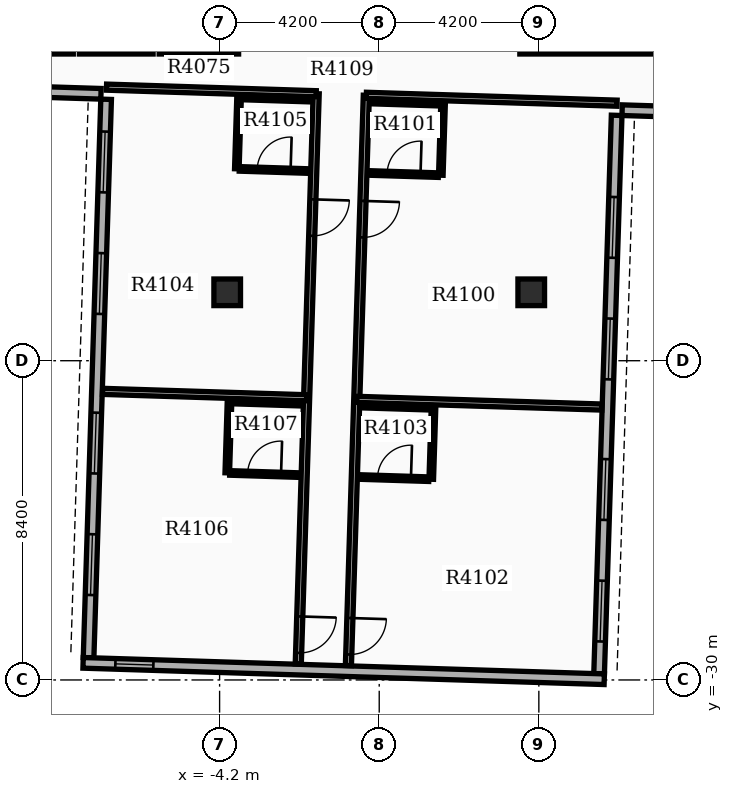
"""IFC4 building model, lengths in metres.
Left out: names, types, materials, properties, quantities, classifications, styles, units other than length and angle.
Written with IfcOpenShell. Run it as: python <this file> out.ifc"""

import sys

from ifc_helpers import new_model, si_unit, direction, frame, frame_2d, origin, origin_2d, place, context, subcontext, project, spatial, rectangle, extrude, element, fill, save


model = new_model("IFC4")
c1 = context("Model", 3, precision=1e-05, world=origin(), true_north=direction((0.0, 1.0)))
c2 = subcontext(c1, "Body", "Model", "MODEL_VIEW")
j1 = project(units=[si_unit("LENGTHUNIT", "METRE"), si_unit("PLANEANGLEUNIT", "RADIAN")], contexts=[c1])
p1 = place(None, origin())
s1 = spatial("IfcSite", under=j1, at=p1, CompositionType="ELEMENT")
p2 = place(p1, origin())
s2 = spatial("IfcBuilding", under=s1, at=p2, CompositionType="ELEMENT")
p3 = place(p2, frame((0.0, 0.0, 257.7)))
s3 = spatial("IfcBuildingStorey", under=s2, at=p3, CompositionType="ELEMENT", Elevation=257.7)
for number, where, z_axis, x_axis in (
    (1, (-4.0, -19.8, 0.0), (0.0, 0.0, 1.0), (1.0, 0.0, 0.0)),
    (2, (4.0, -19.8, 0.0), (0.0, 0.0, 1.0), (1.0, 0.0, 0.0)),
):
    element("IfcColumn", number, at=place(p3, frame(where, z_axis=z_axis, x_axis=x_axis)), inside=s3, PredefinedType="COLUMN", context=c2, shape_type="SweptSolid", body=[
        extrude(rectangle(XDim=0.7, YDim=0.7, at=origin_2d()), origin(), (0.0, 0.0, 1.0), 3.9),
    ])
p4 = place(p3, frame((-7.186, -14.721, 0.0), z_axis=(0.0, 0.0, 1.0), x_axis=(-0.031405855522, -0.999506714454, 0.0)))
e3 = element("IfcWall", 3, at=p4, inside=s3, PredefinedType="STANDARD", context=c2, shape_type="SweptSolid", body=[
    extrude(rectangle(XDim=14.7, YDim=0.28, at=frame_2d((7.35, 0.0))), origin(), (0.0, 0.0, 1.0), 3.18),
])
p5 = place(p4, frame((0.85, 0.0, 0.8)))
e4 = element("IfcOpeningElement", 4, at=p5, cuts=e3, PredefinedType="OPENING", context=c2, shape_type="SweptSolid", body=[
    extrude(rectangle(XDim=1.6, YDim=1.7, at=frame_2d((0.8, 0.85))), frame((0.0, 0.15, 0.0), z_axis=(0.0, -1.0, 0.0), x_axis=(1.0, 0.0, 0.0)), (0.0, 0.0, 1.0), 0.3),
])
p6 = place(p4, frame((4.05, 0.0, 0.8)))
e5 = element("IfcOpeningElement", 5, at=p6, cuts=e3, PredefinedType="OPENING", context=c2, shape_type="SweptSolid", body=[
    extrude(rectangle(XDim=1.6, YDim=1.7, at=frame_2d((0.8, 0.85))), frame((0.0, 0.15, 0.0), z_axis=(0.0, -1.0, 0.0), x_axis=(1.0, 0.0, 0.0)), (0.0, 0.0, 1.0), 0.3),
])
p7 = place(p4, frame((8.25, 0.0, 0.8)))
e6 = element("IfcOpeningElement", 6, at=p7, cuts=e3, PredefinedType="OPENING", context=c2, shape_type="SweptSolid", body=[
    extrude(rectangle(XDim=1.6, YDim=1.7, at=frame_2d((0.8, 0.85))), frame((0.0, 0.15, 0.0), z_axis=(0.0, -1.0, 0.0), x_axis=(1.0, 0.0, 0.0)), (0.0, 0.0, 1.0), 0.3),
])
p8 = place(p4, frame((11.45, 0.0, 0.8)))
e7 = element("IfcOpeningElement", 7, at=p8, cuts=e3, PredefinedType="OPENING", context=c2, shape_type="SweptSolid", body=[
    extrude(rectangle(XDim=1.6, YDim=1.7, at=frame_2d((0.8, 0.85))), frame((0.0, 0.15, 0.0), z_axis=(0.0, -1.0, 0.0), x_axis=(1.0, 0.0, 0.0)), (0.0, 0.0, 1.0), 0.3),
])
p9 = place(p3, frame((5.786, -29.836, 0.0), z_axis=(0.0, 0.0, 1.0), x_axis=(0.031406376864, 0.999506698073, 0.0)))
e8 = element("IfcWall", 8, at=p9, inside=s3, PredefinedType="STANDARD", context=c2, shape_type="SweptSolid", body=[
    extrude(rectangle(XDim=14.7, YDim=0.28, at=frame_2d((7.35, 0.0))), origin(), (0.0, 0.0, 1.0), 3.18),
])
p10 = place(p9, frame((0.85, 0.0, 0.8)))
e9 = element("IfcOpeningElement", 9, at=p10, cuts=e8, PredefinedType="OPENING", context=c2, shape_type="SweptSolid", body=[
    extrude(rectangle(XDim=1.6, YDim=1.7, at=frame_2d((0.8, 0.85))), frame((0.0, 0.15, 0.0), z_axis=(0.0, -1.0, 0.0), x_axis=(1.0, 0.0, 0.0)), (0.0, 0.0, 1.0), 0.3),
])
p11 = place(p9, frame((4.05, 0.0, 0.8)))
e10 = element("IfcOpeningElement", 10, at=p11, cuts=e8, PredefinedType="OPENING", context=c2, shape_type="SweptSolid", body=[
    extrude(rectangle(XDim=1.6, YDim=1.7, at=frame_2d((0.8, 0.85))), frame((0.0, 0.15, 0.0), z_axis=(0.0, -1.0, 0.0), x_axis=(1.0, 0.0, 0.0)), (0.0, 0.0, 1.0), 0.3),
])
p12 = place(p9, frame((7.75, 0.0, 0.8)))
e11 = element("IfcOpeningElement", 11, at=p12, cuts=e8, PredefinedType="OPENING", context=c2, shape_type="SweptSolid", body=[
    extrude(rectangle(XDim=1.6, YDim=1.7, at=frame_2d((0.8, 0.85))), frame((0.0, 0.15, 0.0), z_axis=(0.0, -1.0, 0.0), x_axis=(1.0, 0.0, 0.0)), (0.0, 0.0, 1.0), 0.3),
])
p13 = place(p9, frame((10.95, 0.0, 0.8)))
e12 = element("IfcOpeningElement", 12, at=p13, cuts=e8, PredefinedType="OPENING", context=c2, shape_type="SweptSolid", body=[
    extrude(rectangle(XDim=1.6, YDim=1.7, at=frame_2d((0.8, 0.85))), frame((0.0, 0.15, 0.0), z_axis=(0.0, -1.0, 0.0), x_axis=(1.0, 0.0, 0.0)), (0.0, 0.0, 1.0), 0.3),
])
p14 = place(p3, frame((-7.792, -29.55, 0.0), z_axis=(0.0, 0.0, 1.0), x_axis=(0.999506662003, -0.031407524763, 0.0)))
e13 = element("IfcWall", 13, at=p14, inside=s3, PredefinedType="STANDARD", context=c2, shape_type="SweptSolid", body=[
    extrude(rectangle(XDim=13.72, YDim=0.28, at=frame_2d((6.86, 0.0))), origin(), (0.0, 0.0, 1.0), 3.18),
])
p15 = place(p14, frame((0.85, 0.0, 0.85)))
e14 = element("IfcOpeningElement", 14, at=p15, cuts=e13, PredefinedType="OPENING", context=c2, shape_type="SweptSolid", body=[
    extrude(rectangle(XDim=1.0, YDim=1.5, at=frame_2d((0.5, 0.75))), frame((0.0, 0.15, 0.0), z_axis=(0.0, -1.0, 0.0), x_axis=(1.0, 0.0, 0.0)), (0.0, 0.0, 1.0), 0.3),
])
p16 = place(p3, frame((-13.618, -14.379, 0.0), z_axis=(0.0, 0.0, 1.0), x_axis=(0.999507224741, -0.031389611199, 0.0)))
e15 = element("IfcWall", 15, at=p16, inside=s3, PredefinedType="STANDARD", context=c2, shape_type="SweptSolid", body=[
    extrude(rectangle(XDim=6.3, YDim=0.28, at=frame_2d((3.15, 0.0))), origin(), (0.0, 0.0, 1.0), 3.18),
])
p17 = place(p3, frame((12.689, -15.206, 0.0), z_axis=(0.0, 0.0, 1.0), x_axis=(-0.999507262922, 0.031388395416, 0.0)))
e16 = element("IfcWall", 16, at=p17, inside=s3, PredefinedType="STANDARD", context=c2, shape_type="SweptSolid", body=[
    extrude(rectangle(XDim=6.3, YDim=0.28, at=frame_2d((3.15, 0.0))), origin(), (0.0, 0.0, 1.0), 3.18),
])
p18 = place(p3, frame((3.7, -13.45, 0.0), z_axis=(0.0, 0.0, 1.0), x_axis=(1.0, 0.0, 0.0)))
e17 = element("IfcWall", 17, at=p18, inside=s3, PredefinedType="PARTITIONING", context=c2, shape_type="SweptSolid", body=[
    extrude(rectangle(XDim=3.85, YDim=0.16, at=frame_2d((1.925, 0.0))), origin(), (0.0, 0.0, 1.0), 3.17),
])
p19 = place(p3, frame((-11.0, -13.45, 0.0), z_axis=(0.0, 0.0, 1.0), x_axis=(1.0, 0.0, 0.0)))
e18 = element("IfcWall", 18, at=p19, inside=s3, PredefinedType="PARTITIONING", context=c2, shape_type="SweptSolid", body=[
    extrude(rectangle(XDim=2.95, YDim=0.16, at=frame_2d((1.475, 0.0))), origin(), (0.0, 0.0, 1.0), 3.17),
])
p20 = place(p3, frame((-7.89, -13.45, 0.0), z_axis=(0.0, 0.0, 1.0), x_axis=(1.0, 0.0, 0.0)))
e19 = element("IfcWall", 19, at=p20, inside=s3, PredefinedType="PARTITIONING", context=c2, shape_type="SweptSolid", body=[
    extrude(rectangle(XDim=1.94, YDim=0.16, at=frame_2d((0.97, 0.0))), origin(), (0.0, 0.0, 1.0), 3.17),
])
p21 = place(p3, frame((-5.79, -13.45, 0.0), z_axis=(0.0, 0.0, 1.0), x_axis=(1.0, 0.0, 0.0)))
e20 = element("IfcWall", 20, at=p21, inside=s3, PredefinedType="PARTITIONING", context=c2, shape_type="SweptSolid", body=[
    extrude(rectangle(XDim=2.09, YDim=0.16, at=frame_2d((1.045, 0.0))), origin(), (0.0, 0.0, 1.0), 3.17),
])
p22 = place(p3, frame((-0.339, -14.617, 0.0), z_axis=(0.0, 0.0, 1.0), x_axis=(-0.031404333983, -0.999506762262, 0.0)))
e21 = element("IfcWall", 21, at=p22, inside=s3, PredefinedType="PARTITIONING", context=c2, shape_type="SweptSolid", body=[
    extrude(rectangle(XDim=15.012, YDim=0.16, at=frame_2d((7.506, 0.0))), origin(), (0.0, 0.0, 1.0), 3.17),
])
p23 = place(p22, frame((2.78, 0.0, 0.0)))
e22 = element("IfcOpeningElement", 22, at=p23, cuts=e21, PredefinedType="OPENING", context=c2, shape_type="SweptSolid", body=[
    extrude(rectangle(XDim=0.96, YDim=2.15, at=frame_2d((0.48, 1.075))), frame((0.0, 0.09, 0.0), z_axis=(0.0, -1.0, 0.0), x_axis=(1.0, 0.0, 0.0)), (0.0, 0.0, 1.0), 0.18),
])
p24 = place(p22, frame((13.76, 0.0, 0.0)))
e23 = element("IfcOpeningElement", 23, at=p24, cuts=e21, PredefinedType="OPENING", context=c2, shape_type="SweptSolid", body=[
    extrude(rectangle(XDim=0.96, YDim=2.15, at=frame_2d((0.48, 1.075))), frame((0.0, 0.09, 0.0), z_axis=(0.0, -1.0, 0.0), x_axis=(1.0, 0.0, 0.0)), (0.0, 0.0, 1.0), 0.18),
])
p25 = place(p3, frame((-0.339, -14.617, 0.0), z_axis=(0.0, 0.0, 1.0), x_axis=(0.999506756764, -0.031404508956, 0.0)))
e24 = element("IfcWall", 24, at=p25, inside=s3, PredefinedType="PARTITIONING", context=c2, shape_type="SweptSolid", body=[
    extrude(rectangle(XDim=6.6, YDim=0.16, at=frame_2d((3.3, 0.0))), origin(), (0.0, 0.0, 1.0), 3.17),
])
p26 = place(p3, frame((-0.591, -22.617, 0.0), z_axis=(0.0, 0.0, 1.0), x_axis=(0.999506708632, -0.031406040816, 0.0)))
e25 = element("IfcWall", 25, at=p26, inside=s3, PredefinedType="PARTITIONING", context=c2, shape_type="SweptSolid", body=[
    extrude(rectangle(XDim=6.452, YDim=0.16, at=frame_2d((3.226, 0.0))), origin(), (0.0, 0.0, 1.0), 3.17),
])
p27 = place(p3, frame((-0.263, -16.66, 0.0), z_axis=(0.0, 0.0, 1.0), x_axis=(0.999507221803, -0.031389704724, 0.0)))
e26 = element("IfcWall", 26, at=p27, inside=s3, PredefinedType="PARTITIONING", context=c2, shape_type="SweptSolid", body=[
    extrude(rectangle(XDim=1.82, YDim=0.12, at=frame_2d((0.91, 0.0))), origin(), (0.0, 0.0, 1.0), 3.17),
])
p28 = place(p27, frame((0.47, 0.0, 0.0)))
e27 = element("IfcOpeningElement", 27, at=p28, cuts=e26, PredefinedType="OPENING", context=c2, shape_type="SweptSolid", body=[
    extrude(rectangle(XDim=0.88, YDim=2.1, at=frame_2d((0.44, 1.05))), frame((0.0, 0.07, 0.0), z_axis=(0.0, -1.0, 0.0), x_axis=(1.0, 0.0, 0.0)), (0.0, 0.0, 1.0), 0.14),
])
p29 = place(p3, frame((-0.204, -14.781, 0.0), z_axis=(0.0, 0.0, 1.0), x_axis=(0.999511421504, -0.031255692016, 0.0)))
e28 = element("IfcWall", 28, at=p29, inside=s3, PredefinedType="PARTITIONING", context=c2, shape_type="SweptSolid", body=[
    extrude(rectangle(XDim=1.82, YDim=0.12, at=frame_2d((0.91, 0.0))), origin(), (0.0, 0.0, 1.0), 3.17),
])
p30 = place(p3, frame((1.68, -14.84, 0.0), z_axis=(0.0, 0.0, 1.0), x_axis=(-0.031425292588, -0.999506103526, 0.0)))
e29 = element("IfcWall", 29, at=p30, inside=s3, PredefinedType="PARTITIONING", context=c2, shape_type="SweptSolid", body=[
    extrude(rectangle(XDim=1.88, YDim=0.12, at=frame_2d((0.94, 0.0))), origin(), (0.0, 0.0, 1.0), 3.17),
])
p31 = place(p3, frame((-0.515, -24.66, 0.0), z_axis=(0.0, 0.0, 1.0), x_axis=(0.999503004171, -0.03152371574, 0.0)))
e30 = element("IfcWall", 30, at=p31, inside=s3, PredefinedType="PARTITIONING", context=c2, shape_type="SweptSolid", body=[
    extrude(rectangle(XDim=1.82, YDim=0.12, at=frame_2d((0.91, 0.0))), origin(), (0.0, 0.0, 1.0), 3.17),
])
p32 = place(p31, frame((0.47, 0.0, 0.0)))
e31 = element("IfcOpeningElement", 31, at=p32, cuts=e30, PredefinedType="OPENING", context=c2, shape_type="SweptSolid", body=[
    extrude(rectangle(XDim=0.88, YDim=2.1, at=frame_2d((0.44, 1.05))), frame((0.0, 0.07, 0.0), z_axis=(0.0, -1.0, 0.0), x_axis=(1.0, 0.0, 0.0)), (0.0, 0.0, 1.0), 0.14),
])
p33 = place(p3, frame((-0.456, -22.781, 0.0), z_axis=(0.0, 0.0, 1.0), x_axis=(0.999507221803, -0.031389704724, 0.0)))
e32 = element("IfcWall", 32, at=p33, inside=s3, PredefinedType="PARTITIONING", context=c2, shape_type="SweptSolid", body=[
    extrude(rectangle(XDim=1.82, YDim=0.12, at=frame_2d((0.91, 0.0))), origin(), (0.0, 0.0, 1.0), 3.17),
])
p34 = place(p3, frame((1.428, -22.84, 0.0), z_axis=(0.0, 0.0, 1.0), x_axis=(-0.031425292588, -0.999506103526, 0.0)))
e33 = element("IfcWall", 33, at=p34, inside=s3, PredefinedType="PARTITIONING", context=c2, shape_type="SweptSolid", body=[
    extrude(rectangle(XDim=1.88, YDim=0.12, at=frame_2d((0.94, 0.0))), origin(), (0.0, 0.0, 1.0), 3.17),
])
p35 = place(p3, frame((-1.659, -14.575, 0.0), z_axis=(0.0, 0.0, 1.0), x_axis=(-0.031404333983, -0.999506762262, 0.0)))
e34 = element("IfcWall", 34, at=p35, inside=s3, PredefinedType="PARTITIONING", context=c2, shape_type="SweptSolid", body=[
    extrude(rectangle(XDim=15.012, YDim=0.16, at=frame_2d((7.506, 0.0))), origin(), (0.0, 0.0, 1.0), 3.17),
])
p36 = place(p35, frame((2.78, 0.0, 0.0)))
e35 = element("IfcOpeningElement", 35, at=p36, cuts=e34, PredefinedType="OPENING", context=c2, shape_type="SweptSolid", body=[
    extrude(rectangle(XDim=0.96, YDim=2.15, at=frame_2d((0.48, 1.075))), frame((0.0, 0.09, 0.0), z_axis=(0.0, -1.0, 0.0), x_axis=(1.0, 0.0, 0.0)), (0.0, 0.0, 1.0), 0.18),
])
p37 = place(p35, frame((13.76, 0.0, 0.0)))
e36 = element("IfcOpeningElement", 36, at=p37, cuts=e34, PredefinedType="OPENING", context=c2, shape_type="SweptSolid", body=[
    extrude(rectangle(XDim=0.96, YDim=2.15, at=frame_2d((0.48, 1.075))), frame((0.0, 0.09, 0.0), z_axis=(0.0, -1.0, 0.0), x_axis=(1.0, 0.0, 0.0)), (0.0, 0.0, 1.0), 0.18),
])
p38 = place(p3, frame((-1.659, -14.575, 0.0), z_axis=(0.0, 0.0, 1.0), x_axis=(-0.999505408206, 0.031447400002, 0.0)))
e37 = element("IfcWall", 37, at=p38, inside=s3, PredefinedType="PARTITIONING", context=c2, shape_type="SweptSolid", body=[
    extrude(rectangle(XDim=5.52, YDim=0.16, at=frame_2d((2.76, 0.0))), origin(), (0.0, 0.0, 1.0), 3.17),
])
p39 = place(p3, frame((-1.91, -22.575, 0.0), z_axis=(0.0, 0.0, 1.0), x_axis=(-0.999506785589, 0.031403591545, 0.0)))
e38 = element("IfcWall", 38, at=p39, inside=s3, PredefinedType="PARTITIONING", context=c2, shape_type="SweptSolid", body=[
    extrude(rectangle(XDim=5.372, YDim=0.16, at=frame_2d((2.686, 0.0))), origin(), (0.0, 0.0, 1.0), 3.17),
])
p40 = place(p3, frame((-3.682, -16.552, 0.0), z_axis=(0.0, 0.0, 1.0), x_axis=(0.999507221803, -0.031389704724, 0.0)))
e39 = element("IfcWall", 39, at=p40, inside=s3, PredefinedType="PARTITIONING", context=c2, shape_type="SweptSolid", body=[
    extrude(rectangle(XDim=1.82, YDim=0.12, at=frame_2d((0.91, 0.0))), origin(), (0.0, 0.0, 1.0), 3.17),
])
p41 = place(p40, frame((0.47, 0.0, 0.0)))
e40 = element("IfcOpeningElement", 40, at=p41, cuts=e39, PredefinedType="OPENING", context=c2, shape_type="SweptSolid", body=[
    extrude(rectangle(XDim=0.88, YDim=2.1, at=frame_2d((0.44, 1.05))), frame((0.0, 0.07, 0.0), z_axis=(0.0, -1.0, 0.0), x_axis=(1.0, 0.0, 0.0)), (0.0, 0.0, 1.0), 0.14),
])
p42 = place(p3, frame((-3.623, -14.673, 0.0), z_axis=(0.0, 0.0, 1.0), x_axis=(0.999503004171, -0.03152371574, 0.0)))
e41 = element("IfcWall", 41, at=p42, inside=s3, PredefinedType="PARTITIONING", context=c2, shape_type="SweptSolid", body=[
    extrude(rectangle(XDim=1.82, YDim=0.12, at=frame_2d((0.91, 0.0))), origin(), (0.0, 0.0, 1.0), 3.17),
])
p43 = place(p3, frame((-3.688, -14.671, 0.0), z_axis=(0.0, 0.0, 1.0), x_axis=(-0.031295563454, -0.999510173889, 0.0)))
e42 = element("IfcWall", 42, at=p43, inside=s3, PredefinedType="PARTITIONING", context=c2, shape_type="SweptSolid", body=[
    extrude(rectangle(XDim=1.88, YDim=0.12, at=frame_2d((0.94, 0.0))), origin(), (0.0, 0.0, 1.0), 3.17),
])
p44 = place(p3, frame((-3.933, -24.552, 0.0), z_axis=(0.0, 0.0, 1.0), x_axis=(0.999507221803, -0.031389704724, 0.0)))
e43 = element("IfcWall", 43, at=p44, inside=s3, PredefinedType="PARTITIONING", context=c2, shape_type="SweptSolid", body=[
    extrude(rectangle(XDim=1.82, YDim=0.12, at=frame_2d((0.91, 0.0))), origin(), (0.0, 0.0, 1.0), 3.17),
])
p45 = place(p44, frame((0.47, 0.0, 0.0)))
e44 = element("IfcOpeningElement", 44, at=p45, cuts=e43, PredefinedType="OPENING", context=c2, shape_type="SweptSolid", body=[
    extrude(rectangle(XDim=0.88, YDim=2.1, at=frame_2d((0.44, 1.05))), frame((0.0, 0.07, 0.0), z_axis=(0.0, -1.0, 0.0), x_axis=(1.0, 0.0, 0.0)), (0.0, 0.0, 1.0), 0.14),
])
p46 = place(p3, frame((-3.874, -22.674, 0.0), z_axis=(0.0, 0.0, 1.0), x_axis=(0.999507221803, -0.031389704724, 0.0)))
e45 = element("IfcWall", 45, at=p46, inside=s3, PredefinedType="PARTITIONING", context=c2, shape_type="SweptSolid", body=[
    extrude(rectangle(XDim=1.82, YDim=0.12, at=frame_2d((0.91, 0.0))), origin(), (0.0, 0.0, 1.0), 3.17),
])
p47 = place(p3, frame((-3.939, -22.671, 0.0), z_axis=(0.0, 0.0, 1.0), x_axis=(-0.031295563454, -0.999510173889, 0.0)))
e46 = element("IfcWall", 46, at=p47, inside=s3, PredefinedType="PARTITIONING", context=c2, shape_type="SweptSolid", body=[
    extrude(rectangle(XDim=1.88, YDim=0.12, at=frame_2d((0.94, 0.0))), origin(), (0.0, 0.0, 1.0), 3.17),
])
p48 = place(p5, origin())
e47 = element("IfcWindow", 47, at=p48, inside=s3, PartitioningType="SINGLE_PANEL", PredefinedType="WINDOW", context=c2, shape_type="SweptSolid", body=[
    extrude(rectangle(XDim=1.6, YDim=1.7, at=frame_2d((0.8, 0.85))), frame((0.0, 0.03, 0.0), z_axis=(0.0, -1.0, 0.0), x_axis=(1.0, 0.0, 0.0)), (0.0, 0.0, 1.0), 0.06),
])
fill(e4, e47)
p49 = place(p6, origin())
e48 = element("IfcWindow", 48, at=p49, inside=s3, PartitioningType="SINGLE_PANEL", PredefinedType="WINDOW", context=c2, shape_type="SweptSolid", body=[
    extrude(rectangle(XDim=1.6, YDim=1.7, at=frame_2d((0.8, 0.85))), frame((0.0, 0.03, 0.0), z_axis=(0.0, -1.0, 0.0), x_axis=(1.0, 0.0, 0.0)), (0.0, 0.0, 1.0), 0.06),
])
fill(e5, e48)
p50 = place(p7, origin())
e49 = element("IfcWindow", 49, at=p50, inside=s3, PartitioningType="SINGLE_PANEL", PredefinedType="WINDOW", context=c2, shape_type="SweptSolid", body=[
    extrude(rectangle(XDim=1.6, YDim=1.7, at=frame_2d((0.8, 0.85))), frame((0.0, 0.03, 0.0), z_axis=(0.0, -1.0, 0.0), x_axis=(1.0, 0.0, 0.0)), (0.0, 0.0, 1.0), 0.06),
])
fill(e6, e49)
p51 = place(p8, origin())
e50 = element("IfcWindow", 50, at=p51, inside=s3, PartitioningType="SINGLE_PANEL", PredefinedType="WINDOW", context=c2, shape_type="SweptSolid", body=[
    extrude(rectangle(XDim=1.6, YDim=1.7, at=frame_2d((0.8, 0.85))), frame((0.0, 0.03, 0.0), z_axis=(0.0, -1.0, 0.0), x_axis=(1.0, 0.0, 0.0)), (0.0, 0.0, 1.0), 0.06),
])
fill(e7, e50)
p52 = place(p10, origin())
e51 = element("IfcWindow", 51, at=p52, inside=s3, PartitioningType="SINGLE_PANEL", PredefinedType="WINDOW", context=c2, shape_type="SweptSolid", body=[
    extrude(rectangle(XDim=1.6, YDim=1.7, at=frame_2d((0.8, 0.85))), frame((0.0, 0.03, 0.0), z_axis=(0.0, -1.0, 0.0), x_axis=(1.0, 0.0, 0.0)), (0.0, 0.0, 1.0), 0.06),
])
fill(e9, e51)
p53 = place(p11, origin())
e52 = element("IfcWindow", 52, at=p53, inside=s3, PartitioningType="SINGLE_PANEL", PredefinedType="WINDOW", context=c2, shape_type="SweptSolid", body=[
    extrude(rectangle(XDim=1.6, YDim=1.7, at=frame_2d((0.8, 0.85))), frame((0.0, 0.03, 0.0), z_axis=(0.0, -1.0, 0.0), x_axis=(1.0, 0.0, 0.0)), (0.0, 0.0, 1.0), 0.06),
])
fill(e10, e52)
p54 = place(p12, origin())
e53 = element("IfcWindow", 53, at=p54, inside=s3, PartitioningType="SINGLE_PANEL", PredefinedType="WINDOW", context=c2, shape_type="SweptSolid", body=[
    extrude(rectangle(XDim=1.6, YDim=1.7, at=frame_2d((0.8, 0.85))), frame((0.0, 0.03, 0.0), z_axis=(0.0, -1.0, 0.0), x_axis=(1.0, 0.0, 0.0)), (0.0, 0.0, 1.0), 0.06),
])
fill(e11, e53)
p55 = place(p13, origin())
e54 = element("IfcWindow", 54, at=p55, inside=s3, PartitioningType="SINGLE_PANEL", PredefinedType="WINDOW", context=c2, shape_type="SweptSolid", body=[
    extrude(rectangle(XDim=1.6, YDim=1.7, at=frame_2d((0.8, 0.85))), frame((0.0, 0.03, 0.0), z_axis=(0.0, -1.0, 0.0), x_axis=(1.0, 0.0, 0.0)), (0.0, 0.0, 1.0), 0.06),
])
fill(e12, e54)
p56 = place(p15, origin())
e55 = element("IfcWindow", 55, at=p56, inside=s3, PartitioningType="SINGLE_PANEL", PredefinedType="WINDOW", context=c2, shape_type="SweptSolid", body=[
    extrude(rectangle(XDim=1.0, YDim=1.5, at=frame_2d((0.5, 0.75))), frame((0.0, 0.03, 0.0), z_axis=(0.0, -1.0, 0.0), x_axis=(1.0, 0.0, 0.0)), (0.0, 0.0, 1.0), 0.06),
])
fill(e14, e55)
p57 = place(p23, origin())
e56 = element("IfcDoor", 56, at=p57, inside=s3, OperationType="SINGLE_SWING_LEFT", PredefinedType="DOOR", context=c2, shape_type="SweptSolid", body=[
    extrude(rectangle(XDim=0.96, YDim=2.15, at=frame_2d((0.48, 1.075))), frame((0.0, 0.025, 0.0), z_axis=(0.0, -1.0, 0.0), x_axis=(1.0, 0.0, 0.0)), (0.0, 0.0, 1.0), 0.05),
])
fill(e22, e56)
p58 = place(p28, origin())
e57 = element("IfcDoor", 57, at=p58, inside=s3, OperationType="SINGLE_SWING_RIGHT", PredefinedType="DOOR", context=c2, shape_type="SweptSolid", body=[
    extrude(rectangle(XDim=0.88, YDim=2.1, at=frame_2d((0.44, 1.05))), frame((0.0, 0.025, 0.0), z_axis=(0.0, -1.0, 0.0), x_axis=(1.0, 0.0, 0.0)), (0.0, 0.0, 1.0), 0.05),
])
fill(e27, e57)
p59 = place(p24, origin())
e58 = element("IfcDoor", 58, at=p59, inside=s3, OperationType="SINGLE_SWING_LEFT", PredefinedType="DOOR", context=c2, shape_type="SweptSolid", body=[
    extrude(rectangle(XDim=0.96, YDim=2.15, at=frame_2d((0.48, 1.075))), frame((0.0, 0.025, 0.0), z_axis=(0.0, -1.0, 0.0), x_axis=(1.0, 0.0, 0.0)), (0.0, 0.0, 1.0), 0.05),
])
fill(e23, e58)
p60 = place(p32, origin())
e59 = element("IfcDoor", 59, at=p60, inside=s3, OperationType="SINGLE_SWING_RIGHT", PredefinedType="DOOR", context=c2, shape_type="SweptSolid", body=[
    extrude(rectangle(XDim=0.88, YDim=2.1, at=frame_2d((0.44, 1.05))), frame((0.0, 0.025, 0.0), z_axis=(0.0, -1.0, 0.0), x_axis=(1.0, 0.0, 0.0)), (0.0, 0.0, 1.0), 0.05),
])
fill(e31, e59)
p61 = place(p36, origin())
e60 = element("IfcDoor", 60, at=p61, inside=s3, OperationType="SINGLE_SWING_LEFT", PredefinedType="DOOR", context=c2, shape_type="SweptSolid", body=[
    extrude(rectangle(XDim=0.96, YDim=2.15, at=frame_2d((0.48, 1.075))), frame((0.0, 0.025, 0.0), z_axis=(0.0, -1.0, 0.0), x_axis=(1.0, 0.0, 0.0)), (0.0, 0.0, 1.0), 0.05),
])
fill(e35, e60)
p62 = place(p41, origin())
e61 = element("IfcDoor", 61, at=p62, inside=s3, OperationType="SINGLE_SWING_RIGHT", PredefinedType="DOOR", context=c2, shape_type="SweptSolid", body=[
    extrude(rectangle(XDim=0.88, YDim=2.1, at=frame_2d((0.44, 1.05))), frame((0.0, 0.025, 0.0), z_axis=(0.0, -1.0, 0.0), x_axis=(1.0, 0.0, 0.0)), (0.0, 0.0, 1.0), 0.05),
])
fill(e40, e61)
p63 = place(p37, origin())
e62 = element("IfcDoor", 62, at=p63, inside=s3, OperationType="SINGLE_SWING_LEFT", PredefinedType="DOOR", context=c2, shape_type="SweptSolid", body=[
    extrude(rectangle(XDim=0.96, YDim=2.15, at=frame_2d((0.48, 1.075))), frame((0.0, 0.025, 0.0), z_axis=(0.0, -1.0, 0.0), x_axis=(1.0, 0.0, 0.0)), (0.0, 0.0, 1.0), 0.05),
])
fill(e36, e62)
p64 = place(p45, origin())
e63 = element("IfcDoor", 63, at=p64, inside=s3, OperationType="SINGLE_SWING_RIGHT", PredefinedType="DOOR", context=c2, shape_type="SweptSolid", body=[
    extrude(rectangle(XDim=0.88, YDim=2.1, at=frame_2d((0.44, 1.05))), frame((0.0, 0.025, 0.0), z_axis=(0.0, -1.0, 0.0), x_axis=(1.0, 0.0, 0.0)), (0.0, 0.0, 1.0), 0.05),
])
fill(e44, e63)
save(model, sys.argv[1])
